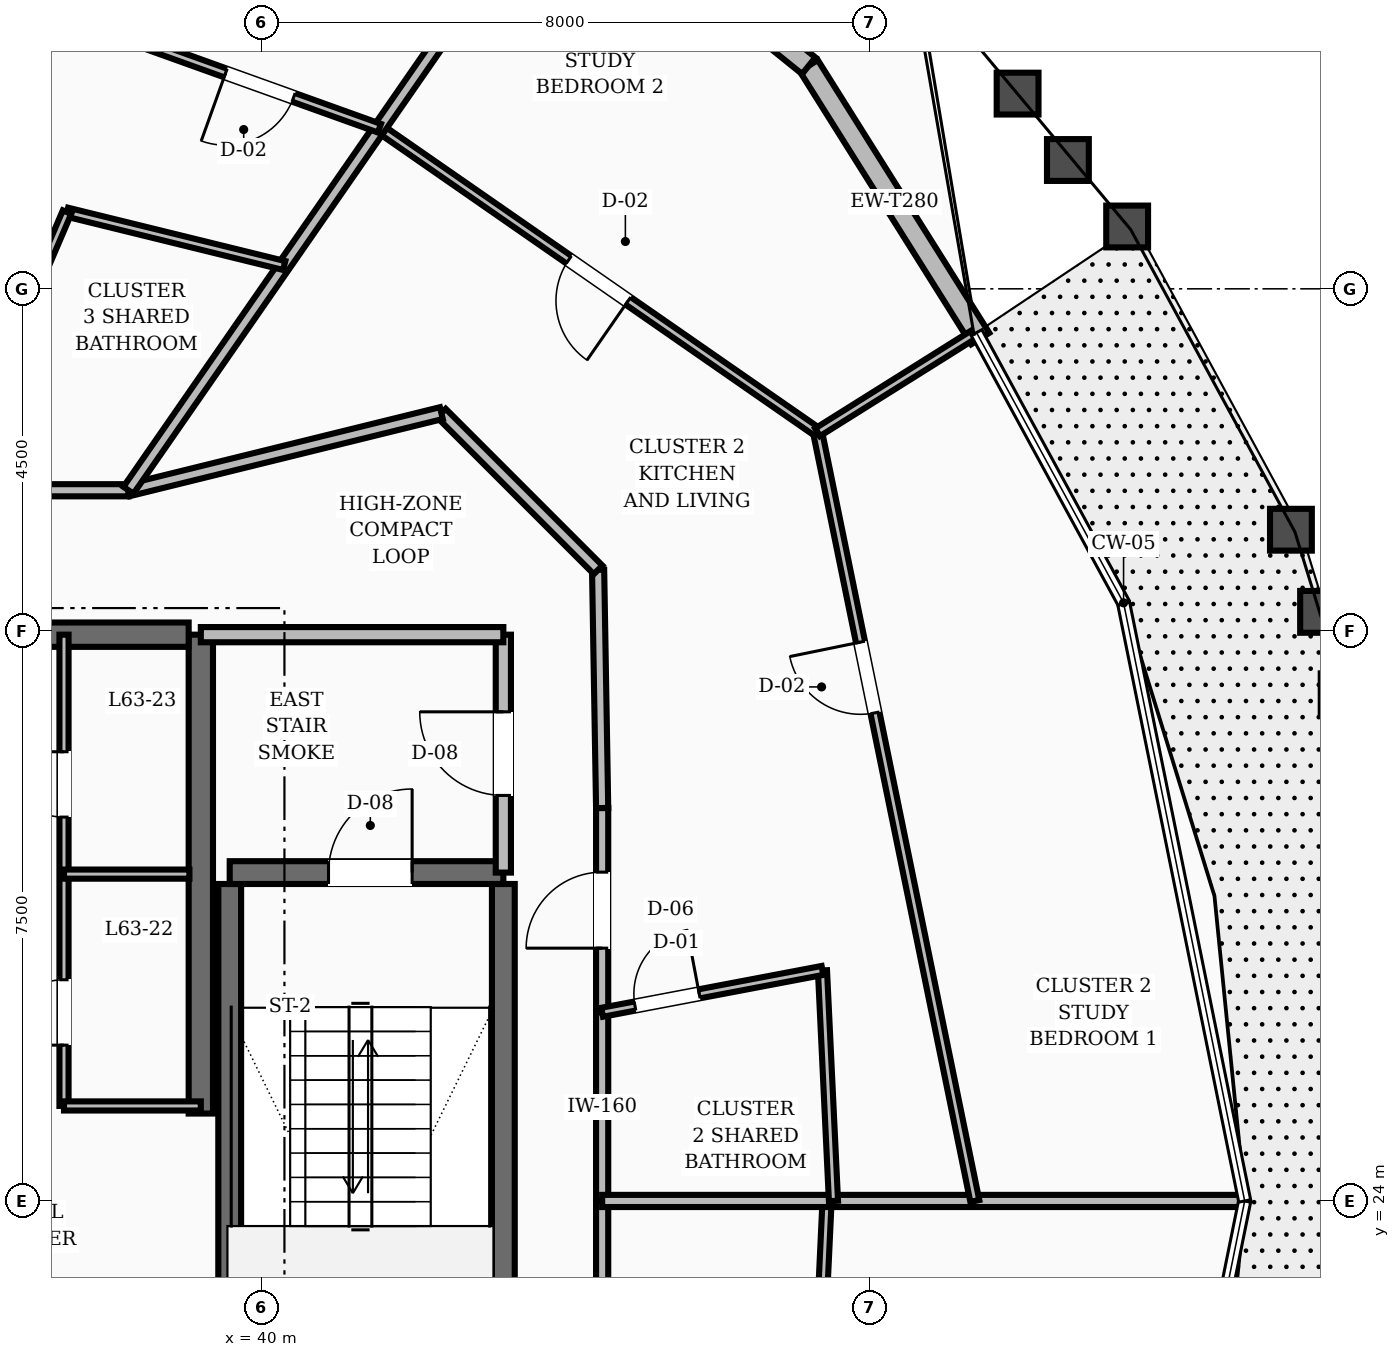
"""IFC4 building model, lengths in metres.
Left out: names, types, materials, properties, quantities, classifications, styles, units other than length and angle.
Written with IfcOpenShell. Run it as: python <this file> out.ifc"""

import sys

from ifc_helpers import new_model, si_unit, direction, frame, frame_2d, origin, place, context, subcontext, project, spatial, rectangle, extrude, element, fill, save


model = new_model("IFC4")
c1 = context("Model", 3, precision=1e-05, world=origin(), true_north=direction((0.0, 1.0)))
c2 = subcontext(c1, "Body", "Model", "MODEL_VIEW")
j1 = project(units=[si_unit("LENGTHUNIT", "METRE"), si_unit("PLANEANGLEUNIT", "RADIAN")], contexts=[c1])
p1 = place(None, origin())
s1 = spatial("IfcSite", under=j1, at=p1, CompositionType="ELEMENT")
p2 = place(p1, origin())
s2 = spatial("IfcBuilding", under=s1, at=p2, CompositionType="ELEMENT")
p3 = place(p2, frame((0.0, 0.0, 243.6)))
s3 = spatial("IfcBuildingStorey", under=s2, at=p3, CompositionType="ELEMENT", Elevation=243.6)
p4 = place(p3, frame((39.2, 25.15, 0.0), z_axis=(0.0, 0.0, 1.0), x_axis=(0.0, 1.0, 0.0)))
e1 = element("IfcWall", 1, at=p4, inside=s3, PredefinedType="SHEAR", context=c2, shape_type="SweptSolid", body=[
    extrude(rectangle(XDim=6.3, YDim=0.32, at=frame_2d((3.15, 0.0))), origin(), (0.0, 0.0, 1.0), 3.6),
])
p5 = place(p3, frame((35.8, 31.45, 0.0), z_axis=(0.0, 0.0, 1.0), x_axis=(1.0, 0.0, 0.0)))
e2 = element("IfcWall", 2, at=p5, inside=s3, PredefinedType="SHEAR", context=c2, shape_type="SweptSolid", body=[
    extrude(rectangle(XDim=3.24, YDim=0.32, at=frame_2d((1.62, 0.0))), origin(), (0.0, 0.0, 1.0), 3.6),
])
p6 = place(p5, frame((0.3, 0.0, 0.0)))
e3 = element("IfcOpeningElement", 3, at=p6, cuts=e2, PredefinedType="OPENING", context=c2, shape_type="SweptSolid", body=[
    extrude(rectangle(XDim=1.1, YDim=2.1, at=frame_2d((0.55, 1.05))), frame((0.0, 0.17, 0.0), z_axis=(0.0, -1.0, 0.0), x_axis=(1.0, 0.0, 0.0)), (0.0, 0.0, 1.0), 0.34),
])
for number, where, z_axis, x_axis in (
    (4, (43.18, 19.43, 0.0), (0.0, 0.0, 1.0), (0.0, 1.0, 0.0)),
    (5, (39.58, 19.43, 0.0), (0.0, 0.0, 1.0), (0.0, 1.0, 0.0)),
):
    element("IfcWall", number, at=place(p3, frame(where, z_axis=z_axis, x_axis=x_axis)), inside=s3, PredefinedType="SHEAR", context=c2, shape_type="SweptSolid", body=[
        extrude(rectangle(XDim=8.74, YDim=0.3, at=frame_2d((4.37, 0.0))), origin(), (0.0, 0.0, 1.0), 3.6),
    ])
p7 = place(p3, frame((39.58, 28.32, 0.0), z_axis=(0.0, 0.0, 1.0), x_axis=(1.0, 0.0, 0.0)))
e6 = element("IfcWall", 6, at=p7, inside=s3, PredefinedType="SHEAR", context=c2, shape_type="SweptSolid", body=[
    extrude(rectangle(XDim=3.6, YDim=0.3, at=frame_2d((1.8, 0.0))), origin(), (0.0, 0.0, 1.0), 3.6),
])
p8 = place(p7, frame((1.3, 0.0, 0.0)))
e7 = element("IfcOpeningElement", 7, at=p8, cuts=e6, PredefinedType="OPENING", context=c2, shape_type="SweptSolid", body=[
    extrude(rectangle(XDim=1.1, YDim=2.1, at=frame_2d((0.55, 1.05))), frame((0.0, 0.16, 0.0), z_axis=(0.0, -1.0, 0.0), x_axis=(1.0, 0.0, 0.0)), (0.0, 0.0, 1.0), 0.32),
])
p9 = place(p3, frame((49.454, 35.346, 0.0), z_axis=(0.0, 0.0, 1.0), x_axis=(-0.532176262315, 0.846633584161, 0.0)))
e8 = element("IfcWall", 8, at=p9, inside=s3, PredefinedType="STANDARD", context=c2, shape_type="SweptSolid", body=[
    extrude(rectangle(XDim=4.24, YDim=0.28, at=frame_2d((2.12, 0.0))), origin(), (0.0, 0.0, 1.0), 2.88),
])
p10 = place(p3, frame((47.198, 38.935, 0.0), z_axis=(0.0, 0.0, 1.0), x_axis=(-0.778409360575, 0.627757012999, 0.0)))
e9 = element("IfcWall", 9, at=p10, inside=s3, PredefinedType="STANDARD", context=c2, shape_type="SweptSolid", body=[
    extrude(rectangle(XDim=4.184, YDim=0.28, at=frame_2d((2.092, 0.0))), origin(), (0.0, 0.0, 1.0), 2.88),
])
p11 = place(p10, frame((0.792, 0.0, 0.8)))
e10 = element("IfcOpeningElement", 10, at=p11, cuts=e9, PredefinedType="OPENING", context=c2, shape_type="SweptSolid", body=[
    extrude(rectangle(XDim=2.6, YDim=1.65, at=frame_2d((1.3, 0.825))), frame((0.0, 0.15, 0.0), z_axis=(0.0, -1.0, 0.0), x_axis=(1.0, 0.0, 0.0)), (0.0, 0.0, 1.0), 0.3),
])
p12 = place(p3, frame((43.18, 28.32, 0.0), z_axis=(0.0, 0.0, 1.0), x_axis=(0.0, 1.0, 0.0)))
e11 = element("IfcWall", 11, at=p12, inside=s3, PredefinedType="SOLIDWALL", context=c2, shape_type="SweptSolid", body=[
    extrude(rectangle(XDim=3.13, YDim=0.2, at=frame_2d((1.565, 0.0))), origin(), (0.0, 0.0, 1.0), 2.87),
])
p13 = place(p12, frame((1.015, 0.0, 0.0)))
e12 = element("IfcOpeningElement", 12, at=p13, cuts=e11, PredefinedType="OPENING", context=c2, shape_type="SweptSolid", body=[
    extrude(rectangle(XDim=1.1, YDim=2.1, at=frame_2d((0.55, 1.05))), frame((0.0, 0.11, 0.0), z_axis=(0.0, -1.0, 0.0), x_axis=(1.0, 0.0, 0.0)), (0.0, 0.0, 1.0), 0.22),
])
p14 = place(p3, frame((39.2, 31.45, 0.0), z_axis=(0.0, 0.0, 1.0), x_axis=(1.0, 0.0, 0.0)))
e13 = element("IfcWall", 13, at=p14, inside=s3, PredefinedType="SOLIDWALL", context=c2, shape_type="SweptSolid", body=[
    extrude(rectangle(XDim=3.98, YDim=0.2, at=frame_2d((1.99, 0.0))), origin(), (0.0, 0.0, 1.0), 2.87),
])
p15 = place(p3, frame((37.4, 25.25, 0.0), z_axis=(0.0, 0.0, 1.0), x_axis=(0.0, 1.0, 0.0)))
e14 = element("IfcWall", 14, at=p15, inside=s3, PredefinedType="PARTITIONING", context=c2, shape_type="SweptSolid", body=[
    extrude(rectangle(XDim=6.2, YDim=0.12, at=frame_2d((3.1, 0.0))), origin(), (0.0, 0.0, 1.0), 2.87),
])
p16 = place(p15, frame((0.8, 0.0, 0.0)))
e15 = element("IfcOpeningElement", 15, at=p16, cuts=e14, PredefinedType="OPENING", context=c2, shape_type="SweptSolid", body=[
    extrude(rectangle(XDim=0.86, YDim=2.1, at=frame_2d((0.43, 1.05))), frame((0.0, 0.07, 0.0), z_axis=(0.0, -1.0, 0.0), x_axis=(1.0, 0.0, 0.0)), (0.0, 0.0, 1.0), 0.14),
])
p17 = place(p15, frame((3.8, 0.0, 0.0)))
e16 = element("IfcOpeningElement", 16, at=p17, cuts=e14, PredefinedType="OPENING", context=c2, shape_type="SweptSolid", body=[
    extrude(rectangle(XDim=0.86, YDim=2.1, at=frame_2d((0.43, 1.05))), frame((0.0, 0.07, 0.0), z_axis=(0.0, -1.0, 0.0), x_axis=(1.0, 0.0, 0.0)), (0.0, 0.0, 1.0), 0.14),
])
p18 = place(p3, frame((37.4, 25.25, 0.0), z_axis=(0.0, 0.0, 1.0), x_axis=(1.0, 0.0, 0.0)))
e17 = element("IfcWall", 17, at=p18, inside=s3, PredefinedType="PARTITIONING", context=c2, shape_type="SweptSolid", body=[
    extrude(rectangle(XDim=1.8, YDim=0.12, at=frame_2d((0.9, 0.0))), origin(), (0.0, 0.0, 1.0), 2.87),
])
p19 = place(p3, frame((37.4, 28.3, 0.0), z_axis=(0.0, 0.0, 1.0), x_axis=(1.0, 0.0, 0.0)))
e18 = element("IfcWall", 18, at=p19, inside=s3, PredefinedType="PARTITIONING", context=c2, shape_type="SweptSolid", body=[
    extrude(rectangle(XDim=1.65, YDim=0.12, at=frame_2d((0.825, 0.0))), origin(), (0.0, 0.0, 1.0), 2.87),
])
p20 = place(p3, frame((44.48, 24.0, 0.0), z_axis=(0.0, 0.0, 1.0), x_axis=(0.0, 1.0, 0.0)))
e19 = element("IfcWall", 19, at=p20, inside=s3, PredefinedType="SOLIDWALL", context=c2, shape_type="SweptSolid", body=[
    extrude(rectangle(XDim=2.482, YDim=0.16, at=frame_2d((1.241, 0.0))), origin(), (0.0, 0.0, 1.0), 2.87),
])
p21 = place(p3, frame((44.48, 26.482, 0.0), z_axis=(0.0, 0.0, 1.0), x_axis=(0.0, 1.0, 0.0)))
e20 = element("IfcWall", 20, at=p21, inside=s3, PredefinedType="SOLIDWALL", context=c2, shape_type="SweptSolid", body=[
    extrude(rectangle(XDim=2.687, YDim=0.16, at=frame_2d((1.344, 0.0))), origin(), (0.0, 0.0, 1.0), 2.87),
])
p22 = place(p21, frame((0.844, 0.0, 0.0)))
e21 = element("IfcOpeningElement", 21, at=p22, cuts=e20, PredefinedType="OPENING", context=c2, shape_type="SweptSolid", body=[
    extrude(rectangle(XDim=1.0, YDim=2.1, at=frame_2d((0.5, 1.05))), frame((0.0, 0.09, 0.0), z_axis=(0.0, -1.0, 0.0), x_axis=(1.0, 0.0, 0.0)), (0.0, 0.0, 1.0), 0.18),
])
p23 = place(p3, frame((44.48, 29.169, 0.0), z_axis=(0.0, 0.0, 1.0), x_axis=(-0.016981035134, 0.999855811828, 0.0)))
e22 = element("IfcWall", 22, at=p23, inside=s3, PredefinedType="SOLIDWALL", context=c2, shape_type="SweptSolid", body=[
    extrude(rectangle(XDim=3.134, YDim=0.16, at=frame_2d((1.567, 0.0))), origin(), (0.0, 0.0, 1.0), 2.87),
])
p24 = place(p3, frame((44.427, 32.303, 0.0), z_axis=(0.0, 0.0, 1.0), x_axis=(-0.707106781187, 0.707106781187, 0.0)))
e23 = element("IfcWall", 23, at=p24, inside=s3, PredefinedType="SOLIDWALL", context=c2, shape_type="SweptSolid", body=[
    extrude(rectangle(XDim=2.916, YDim=0.16, at=frame_2d((1.458, 0.0))), origin(), (0.0, 0.0, 1.0), 2.87),
])
p25 = place(p3, frame((42.365, 34.365, 0.0), z_axis=(0.0, 0.0, 1.0), x_axis=(-0.970939799552, -0.239323850978, 0.0)))
e24 = element("IfcWall", 24, at=p25, inside=s3, PredefinedType="SOLIDWALL", context=c2, shape_type="SweptSolid", body=[
    extrude(rectangle(XDim=4.241, YDim=0.16, at=frame_2d((2.12, 0.0))), origin(), (0.0, 0.0, 1.0), 2.87),
])
p26 = place(p3, frame((38.248, 33.35, 0.0), z_axis=(0.0, 0.0, 1.0), x_axis=(-1.0, 0.0, 0.0)))
e25 = element("IfcWall", 25, at=p26, inside=s3, PredefinedType="SOLIDWALL", context=c2, shape_type="SweptSolid", body=[
    extrude(rectangle(XDim=2.375, YDim=0.16, at=frame_2d((1.188, 0.0))), origin(), (0.0, 0.0, 1.0), 2.87),
])
p27 = place(p3, frame((44.48, 21.518, 0.0), z_axis=(0.0, 0.0, 1.0), x_axis=(0.0, 1.0, 0.0)))
e26 = element("IfcWall", 26, at=p27, inside=s3, PredefinedType="SOLIDWALL", context=c2, shape_type="SweptSolid", body=[
    extrude(rectangle(XDim=2.482, YDim=0.16, at=frame_2d((1.241, 0.0))), origin(), (0.0, 0.0, 1.0), 2.87),
])
p28 = place(p3, frame((47.298, 20.982, 0.0), z_axis=(0.0, 0.0, 1.0), x_axis=(0.046632063195, 0.998912133614, 0.0)))
e27 = element("IfcWall", 27, at=p28, inside=s3, PredefinedType="PARTITIONING", context=c2, shape_type="SweptSolid", body=[
    extrude(rectangle(XDim=3.021, YDim=0.12, at=frame_2d((1.51, 0.0))), origin(), (0.0, 0.0, 1.0), 2.87),
])
p29 = place(p3, frame((44.48, 24.0, 0.0), z_axis=(0.0, 0.0, 1.0), x_axis=(1.0, 0.0, 0.0)))
e28 = element("IfcWall", 28, at=p29, inside=s3, PredefinedType="SOLIDWALL", context=c2, shape_type="SweptSolid", body=[
    extrude(rectangle(XDim=8.403, YDim=0.16, at=frame_2d((4.202, 0.0))), origin(), (0.0, 0.0, 1.0), 2.87),
])
p30 = place(p3, frame((47.523, 24.0, 0.0), z_axis=(0.0, 0.0, 1.0), x_axis=(-0.047683582127, 0.998862491034, 0.0)))
e29 = element("IfcWall", 29, at=p30, inside=s3, PredefinedType="PARTITIONING", context=c2, shape_type="SweptSolid", body=[
    extrude(rectangle(XDim=3.036, YDim=0.12, at=frame_2d((1.518, 0.0))), origin(), (0.0, 0.0, 1.0), 2.87),
])
p31 = place(p3, frame((44.48, 26.482, 0.0), z_axis=(0.0, 0.0, 1.0), x_axis=(0.982449937111, 0.186526462117, 0.0)))
e30 = element("IfcWall", 30, at=p31, inside=s3, PredefinedType="PARTITIONING", context=c2, shape_type="SweptSolid", body=[
    extrude(rectangle(XDim=2.95, YDim=0.12, at=frame_2d((1.475, 0.0))), origin(), (0.0, 0.0, 1.0), 2.87),
])
p32 = place(p31, frame((0.44, 0.0, 0.0)))
e31 = element("IfcOpeningElement", 31, at=p32, cuts=e30, PredefinedType="OPENING", context=c2, shape_type="SweptSolid", body=[
    extrude(rectangle(XDim=0.86, YDim=2.1, at=frame_2d((0.43, 1.05))), frame((0.0, 0.07, 0.0), z_axis=(0.0, -1.0, 0.0), x_axis=(1.0, 0.0, 0.0)), (0.0, 0.0, 1.0), 0.14),
])
p33 = place(p3, frame((49.383, 24.0, 0.0), z_axis=(0.0, 0.0, 1.0), x_axis=(-0.200398815881, 0.979714404607, 0.0)))
e32 = element("IfcWall", 32, at=p33, inside=s3, PredefinedType="PARTITIONING", context=c2, shape_type="SweptSolid", body=[
    extrude(rectangle(XDim=10.323, YDim=0.12, at=frame_2d((5.161, 0.0))), origin(), (0.0, 0.0, 1.0), 2.87),
])
p34 = place(p33, frame((6.554, 0.0, 0.0)))
e33 = element("IfcOpeningElement", 33, at=p34, cuts=e32, PredefinedType="OPENING", context=c2, shape_type="SweptSolid", body=[
    extrude(rectangle(XDim=0.95, YDim=2.1, at=frame_2d((0.475, 1.05))), frame((0.0, 0.07, 0.0), z_axis=(0.0, -1.0, 0.0), x_axis=(1.0, 0.0, 0.0)), (0.0, 0.0, 1.0), 0.14),
])
p35 = place(p3, frame((47.314, 34.113, 0.0), z_axis=(0.0, 0.0, 1.0), x_axis=(-0.821574143978, 0.570101680358, 0.0)))
e34 = element("IfcWall", 34, at=p35, inside=s3, PredefinedType="PARTITIONING", context=c2, shape_type="SweptSolid", body=[
    extrude(rectangle(XDim=7.016, YDim=0.12, at=frame_2d((3.508, 0.0))), origin(), (0.0, 0.0, 1.0), 2.87),
])
p36 = place(p35, frame((3.033, 0.0, 0.0)))
e35 = element("IfcOpeningElement", 35, at=p36, cuts=e34, PredefinedType="OPENING", context=c2, shape_type="SweptSolid", body=[
    extrude(rectangle(XDim=0.95, YDim=2.1, at=frame_2d((0.475, 1.05))), frame((0.0, 0.07, 0.0), z_axis=(0.0, -1.0, 0.0), x_axis=(1.0, 0.0, 0.0)), (0.0, 0.0, 1.0), 0.14),
])
p37 = place(p3, frame((47.314, 34.113, 0.0), z_axis=(0.0, 0.0, 1.0), x_axis=(0.847333885664, 0.5310605297, 0.0)))
e36 = element("IfcWall", 36, at=p37, inside=s3, PredefinedType="PARTITIONING", context=c2, shape_type="SweptSolid", body=[
    extrude(rectangle(XDim=2.418, YDim=0.12, at=frame_2d((1.209, 0.0))), origin(), (0.0, 0.0, 1.0), 2.87),
])
p38 = place(p3, frame((38.248, 33.35, 0.0), z_axis=(0.0, 0.0, 1.0), x_axis=(0.56977166182, 0.821803050242, 0.0)))
e37 = element("IfcWall", 37, at=p38, inside=s3, PredefinedType="SOLIDWALL", context=c2, shape_type="SweptSolid", body=[
    extrude(rectangle(XDim=9.943, YDim=0.16, at=frame_2d((4.971, 0.0))), origin(), (0.0, 0.0, 1.0), 2.87),
])
p39 = place(p3, frame((40.297, 36.306, 0.0), z_axis=(0.0, 0.0, 1.0), x_axis=(-0.971072323886, 0.238785556061, 0.0)))
e38 = element("IfcWall", 38, at=p39, inside=s3, PredefinedType="PARTITIONING", context=c2, shape_type="SweptSolid", body=[
    extrude(rectangle(XDim=2.943, YDim=0.12, at=frame_2d((1.471, 0.0))), origin(), (0.0, 0.0, 1.0), 2.87),
])
p40 = place(p3, frame((35.873, 33.35, 0.0), z_axis=(0.0, 0.0, 1.0), x_axis=(0.393660187427, 0.919256034429, 0.0)))
e39 = element("IfcWall", 39, at=p40, inside=s3, PredefinedType="PARTITIONING", context=c2, shape_type="SweptSolid", body=[
    extrude(rectangle(XDim=3.98, YDim=0.12, at=frame_2d((1.99, 0.0))), origin(), (0.0, 0.0, 1.0), 2.87),
])
p41 = place(p40, frame((0.44, 0.0, 0.0)))
e40 = element("IfcOpeningElement", 40, at=p41, cuts=e39, PredefinedType="OPENING", context=c2, shape_type="SweptSolid", body=[
    extrude(rectangle(XDim=0.86, YDim=2.1, at=frame_2d((0.43, 1.05))), frame((0.0, 0.07, 0.0), z_axis=(0.0, -1.0, 0.0), x_axis=(1.0, 0.0, 0.0)), (0.0, 0.0, 1.0), 0.14),
])
p42 = place(p3, frame((41.55, 38.113, 0.0), z_axis=(0.0, 0.0, 1.0), x_axis=(-0.94115841408, 0.337965737326, 0.0)))
e41 = element("IfcWall", 41, at=p42, inside=s3, PredefinedType="PARTITIONING", context=c2, shape_type="SweptSolid", body=[
    extrude(rectangle(XDim=3.35, YDim=0.12, at=frame_2d((1.675, 0.0))), origin(), (0.0, 0.0, 1.0), 2.87),
])
p43 = place(p42, frame((1.2, 0.0, 0.0)))
e42 = element("IfcOpeningElement", 42, at=p43, cuts=e41, PredefinedType="OPENING", context=c2, shape_type="SweptSolid", body=[
    extrude(rectangle(XDim=0.95, YDim=2.1, at=frame_2d((0.475, 1.05))), frame((0.0, 0.07, 0.0), z_axis=(0.0, -1.0, 0.0), x_axis=(1.0, 0.0, 0.0)), (0.0, 0.0, 1.0), 0.14),
])
p44 = place(p8, origin())
e43 = element("IfcDoor", 43, at=p44, inside=s3, OperationType="SINGLE_SWING_RIGHT", PredefinedType="DOOR", context=c2, shape_type="SweptSolid", body=[
    extrude(rectangle(XDim=1.1, YDim=2.1, at=frame_2d((0.55, 1.05))), frame((0.0, 0.025, 0.0), z_axis=(0.0, -1.0, 0.0), x_axis=(1.0, 0.0, 0.0)), (0.0, 0.0, 1.0), 0.05),
])
fill(e7, e43)
p45 = place(p13, origin())
e44 = element("IfcDoor", 44, at=p45, inside=s3, OperationType="SINGLE_SWING_RIGHT", PredefinedType="DOOR", context=c2, shape_type="SweptSolid", body=[
    extrude(rectangle(XDim=1.1, YDim=2.1, at=frame_2d((0.55, 1.05))), frame((0.0, 0.025, 0.0), z_axis=(0.0, -1.0, 0.0), x_axis=(1.0, 0.0, 0.0)), (0.0, 0.0, 1.0), 0.05),
])
fill(e12, e44)
p46 = place(p16, origin())
e45 = element("IfcDoor", 45, at=p46, inside=s3, OperationType="SINGLE_SWING_LEFT", PredefinedType="DOOR", context=c2, shape_type="SweptSolid", body=[
    extrude(rectangle(XDim=0.86, YDim=2.1, at=frame_2d((0.43, 1.05))), frame((0.0, 0.025, 0.0), z_axis=(0.0, -1.0, 0.0), x_axis=(1.0, 0.0, 0.0)), (0.0, 0.0, 1.0), 0.05),
])
fill(e15, e45)
p47 = place(p17, origin())
e46 = element("IfcDoor", 46, at=p47, inside=s3, OperationType="SINGLE_SWING_RIGHT", PredefinedType="DOOR", context=c2, shape_type="SweptSolid", body=[
    extrude(rectangle(XDim=0.86, YDim=2.1, at=frame_2d((0.43, 1.05))), frame((0.0, 0.025, 0.0), z_axis=(0.0, -1.0, 0.0), x_axis=(1.0, 0.0, 0.0)), (0.0, 0.0, 1.0), 0.05),
])
fill(e16, e46)
p48 = place(p32, origin())
e47 = element("IfcDoor", 47, at=p48, inside=s3, OperationType="SINGLE_SWING_RIGHT", PredefinedType="DOOR", context=c2, shape_type="SweptSolid", body=[
    extrude(rectangle(XDim=0.86, YDim=2.1, at=frame_2d((0.43, 1.05))), frame((0.0, 0.025, 0.0), z_axis=(0.0, -1.0, 0.0), x_axis=(1.0, 0.0, 0.0)), (0.0, 0.0, 1.0), 0.05),
])
fill(e31, e47)
p49 = place(p22, origin())
e48 = element("IfcDoor", 48, at=p49, inside=s3, OperationType="SINGLE_SWING_LEFT", PredefinedType="DOOR", context=c2, shape_type="SweptSolid", body=[
    extrude(rectangle(XDim=1.0, YDim=2.1, at=frame_2d((0.5, 1.05))), frame((0.0, 0.025, 0.0), z_axis=(0.0, -1.0, 0.0), x_axis=(1.0, 0.0, 0.0)), (0.0, 0.0, 1.0), 0.05),
])
fill(e21, e48)
p50 = place(p34, origin())
e49 = element("IfcDoor", 49, at=p50, inside=s3, OperationType="SINGLE_SWING_RIGHT", PredefinedType="DOOR", context=c2, shape_type="SweptSolid", body=[
    extrude(rectangle(XDim=0.95, YDim=2.1, at=frame_2d((0.475, 1.05))), frame((0.0, 0.025, 0.0), z_axis=(0.0, -1.0, 0.0), x_axis=(1.0, 0.0, 0.0)), (0.0, 0.0, 1.0), 0.05),
])
fill(e33, e49)
p51 = place(p36, origin())
e50 = element("IfcDoor", 50, at=p51, inside=s3, OperationType="SINGLE_SWING_LEFT", PredefinedType="DOOR", context=c2, shape_type="SweptSolid", body=[
    extrude(rectangle(XDim=0.95, YDim=2.1, at=frame_2d((0.475, 1.05))), frame((0.0, 0.025, 0.0), z_axis=(0.0, -1.0, 0.0), x_axis=(1.0, 0.0, 0.0)), (0.0, 0.0, 1.0), 0.05),
])
fill(e35, e50)
p52 = place(p43, origin())
e51 = element("IfcDoor", 51, at=p52, inside=s3, OperationType="SINGLE_SWING_RIGHT", PredefinedType="DOOR", context=c2, shape_type="SweptSolid", body=[
    extrude(rectangle(XDim=0.95, YDim=2.1, at=frame_2d((0.475, 1.05))), frame((0.0, 0.025, 0.0), z_axis=(0.0, -1.0, 0.0), x_axis=(1.0, 0.0, 0.0)), (0.0, 0.0, 1.0), 0.05),
])
fill(e42, e51)
save(model, sys.argv[1])
